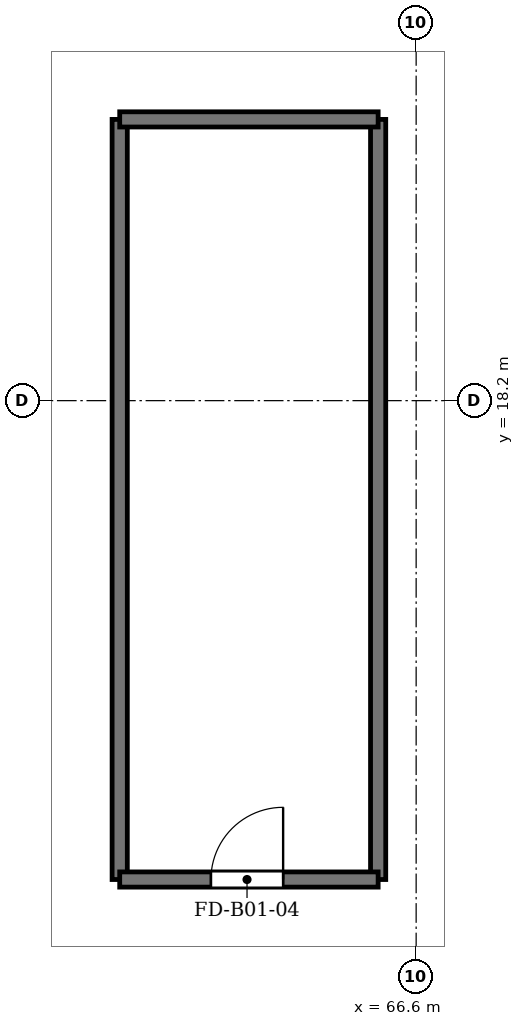
"""IFC4 building model, lengths in metres.
Left out: names, types, materials, properties, quantities, classifications, styles, units other than length and angle.
Written with IfcOpenShell. Run it as: python <this file> out.ifc"""

import sys

from ifc_helpers import new_model, si_unit, direction, frame, frame_2d, origin, place, context, subcontext, project, spatial, rectangle, extrude, source, transform, mapped, element, fill, save


model = new_model("IFC4")
c1 = context("Model", 3, precision=1e-05, world=origin(), true_north=direction((0.0, 1.0)))
c2 = subcontext(c1, "Body", "Model", "MODEL_VIEW")
j1 = project(units=[si_unit("LENGTHUNIT", "METRE"), si_unit("PLANEANGLEUNIT", "RADIAN")], contexts=[c1])
p1 = place(None, origin())
s1 = spatial("IfcSite", under=j1, at=p1, CompositionType="ELEMENT")
p2 = place(p1, origin())
s2 = spatial("IfcBuilding", under=s1, at=p2, CompositionType="ELEMENT")
p3 = place(p2, frame((0.0, 0.0, -4.3)))
s3 = spatial("IfcBuildingStorey", under=s2, at=p3, CompositionType="ELEMENT", Elevation=-4.3)
for number, where, z_axis, x_axis in (
    (1, (62.7, 11.9, 0.0), (0.0, 0.0, 1.0), (0.0, 1.0, 0.0)),
    (2, (66.1, 11.9, 0.0), (0.0, 0.0, 1.0), (0.0, 1.0, 0.0)),
):
    element("IfcWall", number, at=place(p3, frame(where, z_axis=z_axis, x_axis=x_axis)), inside=s3, PredefinedType="SHEAR", context=c2, shape_type="SweptSolid", body=[
        extrude(rectangle(XDim=10.0, YDim=0.2, at=frame_2d((5.0, 0.0))), origin(), (0.0, 0.0, 1.0), 3.94),
    ])
p4 = place(p3, frame((62.7, 11.9, 0.0), z_axis=(0.0, 0.0, 1.0), x_axis=(1.0, 0.0, 0.0)))
e3 = element("IfcWall", 3, at=p4, inside=s3, PredefinedType="SHEAR", context=c2, shape_type="SweptSolid", body=[
    extrude(rectangle(XDim=3.4, YDim=0.2, at=frame_2d((1.7, 0.0))), origin(), (0.0, 0.0, 1.0), 3.94),
])
p5 = place(p4, frame((1.2, 0.0, 0.0)))
e4 = element("IfcOpeningElement", 4, at=p5, cuts=e3, PredefinedType="OPENING", context=c2, shape_type="SweptSolid", body=[
    extrude(rectangle(XDim=0.95, YDim=2.15, at=frame_2d((0.475, 1.075))), frame((0.0, 0.11, 0.0), z_axis=(0.0, -1.0, 0.0), x_axis=(1.0, 0.0, 0.0)), (0.0, 0.0, 1.0), 0.22),
])
p6 = place(p3, frame((62.7, 21.9, 0.0), z_axis=(0.0, 0.0, 1.0), x_axis=(1.0, 0.0, 0.0)))
e5 = element("IfcWall", 5, at=p6, inside=s3, PredefinedType="SHEAR", context=c2, shape_type="SweptSolid", body=[
    extrude(rectangle(XDim=3.4, YDim=0.2, at=frame_2d((1.7, 0.0))), origin(), (0.0, 0.0, 1.0), 3.94),
])
m1 = source(origin(), c2, "Body", "SweptSolid", [
    extrude(rectangle(XDim=0.95, YDim=2.15, at=frame_2d((0.475, 1.075))), frame((0.0, 0.025, 0.0), z_axis=(0.0, -1.0, 0.0), x_axis=(1.0, 0.0, 0.0)), (0.0, 0.0, 1.0), 0.05),
])
p7 = place(p5, origin())
e6 = element("IfcDoor", 6, at=p7, inside=s3, OperationType="SINGLE_SWING_RIGHT", PredefinedType="DOOR", context=c2, shape_type="MappedRepresentation", body=[
    mapped(m1, transform((0.0, 0.0, 0.0), x_axis=(1.0, 0.0, 0.0), y_axis=(0.0, 1.0, 0.0), z_axis=(0.0, 0.0, 1.0), scale=1.0)),
])
fill(e4, e6)
save(model, sys.argv[1])
